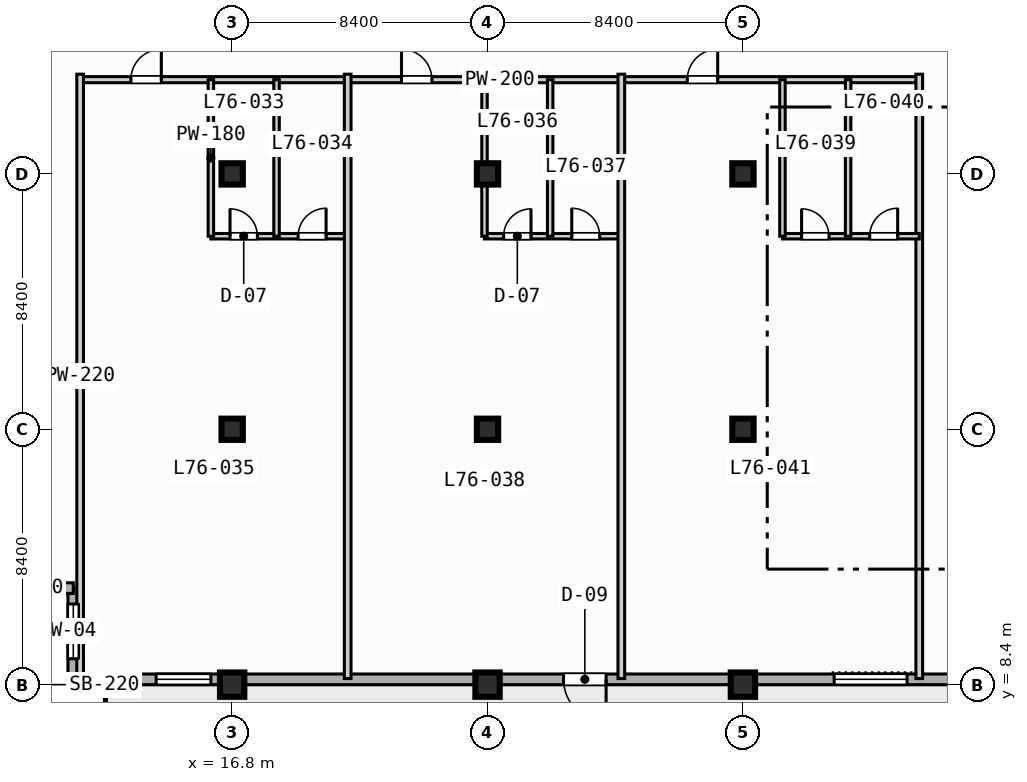
"""IFC4 building model, lengths in metres.
Left out: names, types, materials, properties, quantities, classifications, styles, units other than length and angle.
Written with IfcOpenShell. Run it as: python <this file> out.ifc"""

import sys

from ifc_helpers import new_model, si_unit, direction, frame, frame_2d, origin, origin_2d, place, context, subcontext, project, spatial, rectangle, extrude, element, fill, save


model = new_model("IFC4")
c1 = context("Model", 3, precision=1e-05, world=origin(), true_north=direction((0.0, 1.0)))
c2 = subcontext(c1, "Body", "Model", "MODEL_VIEW")
j1 = project(units=[si_unit("LENGTHUNIT", "METRE"), si_unit("PLANEANGLEUNIT", "RADIAN")], contexts=[c1])
p1 = place(None, origin())
s1 = spatial("IfcSite", under=j1, at=p1, CompositionType="ELEMENT")
p2 = place(p1, origin())
s2 = spatial("IfcBuilding", under=s1, at=p2, CompositionType="ELEMENT")
p3 = place(p2, frame((0.0, 0.0, 308.6)))
s3 = spatial("IfcBuildingStorey", under=s2, at=p3, CompositionType="ELEMENT", Elevation=308.6)
p4 = place(p3, frame((16.8, 8.4, 0.0), z_axis=(0.0, 0.0, 1.0), x_axis=(1.0, 0.0, 0.0)))
e1 = element("IfcColumn", 1, at=p4, inside=s3, PredefinedType="COLUMN", context=c2, shape_type="SweptSolid", body=[
    extrude(rectangle(XDim=0.8, YDim=0.8, at=origin_2d()), origin(), (0.0, 0.0, 1.0), 3.9),
])
for number, where, z_axis, x_axis in (
    (2, (16.8, 16.8, 0.0), (0.0, 0.0, 1.0), (1.0, 0.0, 0.0)),
    (3, (16.8, 25.2, 0.0), (0.0, 0.0, 1.0), (1.0, 0.0, 0.0)),
):
    element("IfcColumn", number, at=place(p3, frame(where, z_axis=z_axis, x_axis=x_axis)), inside=s3, PredefinedType="COLUMN", context=c2, shape_type="SweptSolid", body=[
        extrude(rectangle(XDim=0.7, YDim=0.7, at=origin_2d()), origin(), (0.0, 0.0, 1.0), 3.9),
    ])
p5 = place(p3, frame((25.2, 8.4, 0.0), z_axis=(0.0, 0.0, 1.0), x_axis=(1.0, 0.0, 0.0)))
e4 = element("IfcColumn", 4, at=p5, inside=s3, PredefinedType="COLUMN", context=c2, shape_type="SweptSolid", body=[
    extrude(rectangle(XDim=0.8, YDim=0.8, at=origin_2d()), origin(), (0.0, 0.0, 1.0), 3.9),
])
for number, where, z_axis, x_axis in (
    (5, (25.2, 16.8, 0.0), (0.0, 0.0, 1.0), (1.0, 0.0, 0.0)),
    (6, (25.2, 25.2, 0.0), (0.0, 0.0, 1.0), (1.0, 0.0, 0.0)),
):
    element("IfcColumn", number, at=place(p3, frame(where, z_axis=z_axis, x_axis=x_axis)), inside=s3, PredefinedType="COLUMN", context=c2, shape_type="SweptSolid", body=[
        extrude(rectangle(XDim=0.7, YDim=0.7, at=origin_2d()), origin(), (0.0, 0.0, 1.0), 3.9),
    ])
p6 = place(p3, frame((33.6, 8.4, 0.0), z_axis=(0.0, 0.0, 1.0), x_axis=(1.0, 0.0, 0.0)))
e7 = element("IfcColumn", 7, at=p6, inside=s3, PredefinedType="COLUMN", context=c2, shape_type="SweptSolid", body=[
    extrude(rectangle(XDim=0.8, YDim=0.8, at=origin_2d()), origin(), (0.0, 0.0, 1.0), 3.9),
])
for number, where, z_axis, x_axis in (
    (8, (33.6, 16.8, 0.0), (0.0, 0.0, 1.0), (1.0, 0.0, 0.0)),
    (9, (33.6, 25.2, 0.0), (0.0, 0.0, 1.0), (1.0, 0.0, 0.0)),
):
    element("IfcColumn", number, at=place(p3, frame(where, z_axis=z_axis, x_axis=x_axis)), inside=s3, PredefinedType="COLUMN", context=c2, shape_type="SweptSolid", body=[
        extrude(rectangle(XDim=0.7, YDim=0.7, at=origin_2d()), origin(), (0.0, 0.0, 1.0), 3.9),
    ])
p7 = place(p3, frame((11.575, 8.575, 0.0), z_axis=(0.0, 0.0, 1.0), x_axis=(0.0, 1.0, 0.0)))
e10 = element("IfcWall", 10, at=p7, inside=s3, PredefinedType="STANDARD", context=c2, shape_type="SweptSolid", body=[
    extrude(rectangle(XDim=3.0, YDim=0.35, at=frame_2d((1.5, 0.0))), origin(), (0.0, 0.0, 1.0), 3.67),
])
p8 = place(p7, frame((0.677, 0.0, 0.85)))
e11 = element("IfcOpeningElement", 11, at=p8, cuts=e10, PredefinedType="OPENING", context=c2, shape_type="SweptSolid", body=[
    extrude(rectangle(XDim=1.8, YDim=1.8, at=frame_2d((0.9, 0.9))), frame((0.0, 0.185, 0.0), z_axis=(0.0, -1.0, 0.0), x_axis=(1.0, 0.0, 0.0)), (0.0, 0.0, 1.0), 0.37),
])
p9 = place(p3, frame((11.575, 11.575, 0.0), z_axis=(0.0, 0.0, 1.0), x_axis=(-1.0, 0.0, 0.0)))
e12 = element("IfcWall", 12, at=p9, inside=s3, PredefinedType="STANDARD", context=c2, shape_type="SweptSolid", body=[
    extrude(rectangle(XDim=3.0, YDim=0.35, at=frame_2d((1.5, 0.0))), origin(), (0.0, 0.0, 1.0), 3.67),
])
p10 = place(p3, frame((64.025, 8.575, 0.0), z_axis=(0.0, 0.0, 1.0), x_axis=(-1.0, 0.0, 0.0)))
e13 = element("IfcWall", 13, at=p10, inside=s3, PredefinedType="STANDARD", context=c2, shape_type="SweptSolid", body=[
    extrude(rectangle(XDim=52.45, YDim=0.35, at=frame_2d((26.225, 0.0))), origin(), (0.0, 0.0, 1.0), 3.67),
])
p11 = place(p10, frame((34.925, 0.0, 0.0)))
e14 = element("IfcOpeningElement", 14, at=p11, cuts=e13, PredefinedType="OPENING", context=c2, shape_type="SweptSolid", body=[
    extrude(rectangle(XDim=1.4, YDim=2.2, at=frame_2d((0.7, 1.1))), frame((0.0, 0.185, 0.0), z_axis=(0.0, -1.0, 0.0), x_axis=(1.0, 0.0, 0.0)), (0.0, 0.0, 1.0), 0.37),
])
p12 = place(p10, frame((25.025, 0.0, 0.85)))
e15 = element("IfcOpeningElement", 15, at=p12, cuts=e13, PredefinedType="OPENING", context=c2, shape_type="SweptSolid", body=[
    extrude(rectangle(XDim=2.4, YDim=1.95, at=frame_2d((1.2, 0.975))), frame((0.0, 0.185, 0.0), z_axis=(0.0, -1.0, 0.0), x_axis=(1.0, 0.0, 0.0)), (0.0, 0.0, 1.0), 0.37),
])
p13 = place(p10, frame((16.925, 0.0, 0.85)))
e16 = element("IfcOpeningElement", 16, at=p13, cuts=e13, PredefinedType="OPENING", context=c2, shape_type="SweptSolid", body=[
    extrude(rectangle(XDim=1.8, YDim=1.8, at=frame_2d((0.9, 0.9))), frame((0.0, 0.185, 0.0), z_axis=(0.0, -1.0, 0.0), x_axis=(1.0, 0.0, 0.0)), (0.0, 0.0, 1.0), 0.37),
])
p14 = place(p10, frame((47.925, 0.0, 0.85)))
e17 = element("IfcOpeningElement", 17, at=p14, cuts=e13, PredefinedType="OPENING", context=c2, shape_type="SweptSolid", body=[
    extrude(rectangle(XDim=1.8, YDim=1.8, at=frame_2d((0.9, 0.9))), frame((0.0, 0.185, 0.0), z_axis=(0.0, -1.0, 0.0), x_axis=(1.0, 0.0, 0.0)), (0.0, 0.0, 1.0), 0.37),
])
p15 = place(p3, frame((11.8, 28.3, 0.0), z_axis=(0.0, 0.0, 1.0), x_axis=(1.0, 0.0, 0.0)))
e18 = element("IfcWall", 18, at=p15, inside=s3, PredefinedType="PARTITIONING", context=c2, shape_type="SweptSolid", body=[
    extrude(rectangle(XDim=27.6, YDim=0.2, at=frame_2d((13.8, 0.0))), origin(), (0.0, 0.0, 1.0), 3.67),
])
p16 = place(p15, frame((1.67, 0.0, 0.0)))
e19 = element("IfcOpeningElement", 19, at=p16, cuts=e18, PredefinedType="OPENING", context=c2, shape_type="SweptSolid", body=[
    extrude(rectangle(XDim=1.0, YDim=2.15, at=frame_2d((0.5, 1.075))), frame((0.0, 0.11, 0.0), z_axis=(0.0, -1.0, 0.0), x_axis=(1.0, 0.0, 0.0)), (0.0, 0.0, 1.0), 0.22),
])
p17 = place(p15, frame((10.57, 0.0, 0.0)))
e20 = element("IfcOpeningElement", 20, at=p17, cuts=e18, PredefinedType="OPENING", context=c2, shape_type="SweptSolid", body=[
    extrude(rectangle(XDim=1.0, YDim=2.15, at=frame_2d((0.5, 1.075))), frame((0.0, 0.11, 0.0), z_axis=(0.0, -1.0, 0.0), x_axis=(1.0, 0.0, 0.0)), (0.0, 0.0, 1.0), 0.22),
])
p18 = place(p15, frame((19.97, 0.0, 0.0)))
e21 = element("IfcOpeningElement", 21, at=p18, cuts=e18, PredefinedType="OPENING", context=c2, shape_type="SweptSolid", body=[
    extrude(rectangle(XDim=1.0, YDim=2.15, at=frame_2d((0.5, 1.075))), frame((0.0, 0.11, 0.0), z_axis=(0.0, -1.0, 0.0), x_axis=(1.0, 0.0, 0.0)), (0.0, 0.0, 1.0), 0.22),
])
p19 = place(p3, frame((11.8, 8.6, 0.0), z_axis=(0.0, 0.0, 1.0), x_axis=(0.0, 1.0, 0.0)))
e22 = element("IfcWall", 22, at=p19, inside=s3, PredefinedType="PARTITIONING", context=c2, shape_type="SweptSolid", body=[
    extrude(rectangle(XDim=19.88, YDim=0.22, at=frame_2d((9.94, 0.0))), origin(), (0.0, 0.0, 1.0), 3.67),
])
p20 = place(p3, frame((16.1, 23.15, 0.0), z_axis=(0.0, 0.0, 1.0), x_axis=(1.0, 0.0, 0.0)))
e23 = element("IfcWall", 23, at=p20, inside=s3, PredefinedType="PLUMBINGWALL", context=c2, shape_type="SweptSolid", body=[
    extrude(rectangle(XDim=4.5, YDim=0.18, at=frame_2d((2.25, 0.0))), origin(), (0.0, 0.0, 1.0), 3.67),
])
p21 = place(p20, frame((0.63, 0.0, 0.0)))
e24 = element("IfcOpeningElement", 24, at=p21, cuts=e23, PredefinedType="OPENING", context=c2, shape_type="SweptSolid", body=[
    extrude(rectangle(XDim=0.9, YDim=2.1, at=frame_2d((0.45, 1.05))), frame((0.0, 0.1, 0.0), z_axis=(0.0, -1.0, 0.0), x_axis=(1.0, 0.0, 0.0)), (0.0, 0.0, 1.0), 0.2),
])
p22 = place(p20, frame((2.87, 0.0, 0.0)))
e25 = element("IfcOpeningElement", 25, at=p22, cuts=e23, PredefinedType="OPENING", context=c2, shape_type="SweptSolid", body=[
    extrude(rectangle(XDim=0.92, YDim=2.1, at=frame_2d((0.46, 1.05))), frame((0.0, 0.1, 0.0), z_axis=(0.0, -1.0, 0.0), x_axis=(1.0, 0.0, 0.0)), (0.0, 0.0, 1.0), 0.2),
])
for number, where, z_axis, x_axis in (
    (26, (16.1, 23.15, 0.0), (0.0, 0.0, 1.0), (0.0, 1.0, 0.0)),
    (27, (18.26, 23.15, 0.0), (0.0, 0.0, 1.0), (0.0, 1.0, 0.0)),
):
    element("IfcWall", number, at=place(p3, frame(where, z_axis=z_axis, x_axis=x_axis)), inside=s3, PredefinedType="PLUMBINGWALL", context=c2, shape_type="SweptSolid", body=[
        extrude(rectangle(XDim=5.15, YDim=0.18, at=frame_2d((2.575, 0.0))), origin(), (0.0, 0.0, 1.0), 3.67),
    ])
p23 = place(p3, frame((20.6, 8.6, 0.0), z_axis=(0.0, 0.0, 1.0), x_axis=(0.0, 1.0, 0.0)))
e28 = element("IfcWall", 28, at=p23, inside=s3, PredefinedType="PARTITIONING", context=c2, shape_type="SweptSolid", body=[
    extrude(rectangle(XDim=19.88, YDim=0.22, at=frame_2d((9.94, 0.0))), origin(), (0.0, 0.0, 1.0), 3.67),
])
p24 = place(p3, frame((25.1, 23.15, 0.0), z_axis=(0.0, 0.0, 1.0), x_axis=(1.0, 0.0, 0.0)))
e29 = element("IfcWall", 29, at=p24, inside=s3, PredefinedType="PLUMBINGWALL", context=c2, shape_type="SweptSolid", body=[
    extrude(rectangle(XDim=4.5, YDim=0.18, at=frame_2d((2.25, 0.0))), origin(), (0.0, 0.0, 1.0), 3.67),
])
p25 = place(p24, frame((0.63, 0.0, 0.0)))
e30 = element("IfcOpeningElement", 30, at=p25, cuts=e29, PredefinedType="OPENING", context=c2, shape_type="SweptSolid", body=[
    extrude(rectangle(XDim=0.9, YDim=2.1, at=frame_2d((0.45, 1.05))), frame((0.0, 0.1, 0.0), z_axis=(0.0, -1.0, 0.0), x_axis=(1.0, 0.0, 0.0)), (0.0, 0.0, 1.0), 0.2),
])
p26 = place(p24, frame((2.87, 0.0, 0.0)))
e31 = element("IfcOpeningElement", 31, at=p26, cuts=e29, PredefinedType="OPENING", context=c2, shape_type="SweptSolid", body=[
    extrude(rectangle(XDim=0.92, YDim=2.1, at=frame_2d((0.46, 1.05))), frame((0.0, 0.1, 0.0), z_axis=(0.0, -1.0, 0.0), x_axis=(1.0, 0.0, 0.0)), (0.0, 0.0, 1.0), 0.2),
])
p27 = place(p3, frame((25.1, 23.15, 0.0), z_axis=(0.0, 0.0, 1.0), x_axis=(0.0, 1.0, 0.0)))
e32 = element("IfcWall", 32, at=p27, inside=s3, PredefinedType="PLUMBINGWALL", context=c2, shape_type="SweptSolid", body=[
    extrude(rectangle(XDim=5.15, YDim=0.18, at=frame_2d((2.575, 0.0))), origin(), (0.0, 0.0, 1.0), 3.07),
])
p28 = place(p3, frame((27.26, 23.15, 0.0), z_axis=(0.0, 0.0, 1.0), x_axis=(0.0, 1.0, 0.0)))
e33 = element("IfcWall", 33, at=p28, inside=s3, PredefinedType="PLUMBINGWALL", context=c2, shape_type="SweptSolid", body=[
    extrude(rectangle(XDim=5.15, YDim=0.18, at=frame_2d((2.575, 0.0))), origin(), (0.0, 0.0, 1.0), 3.67),
])
for number, where, z_axis, x_axis in (
    (34, (29.6, 8.6, 0.0), (0.0, 0.0, 1.0), (0.0, 1.0, 0.0)),
    (35, (39.4, 8.6, 0.0), (0.0, 0.0, 1.0), (0.0, 1.0, 0.0)),
):
    element("IfcWall", number, at=place(p3, frame(where, z_axis=z_axis, x_axis=x_axis)), inside=s3, PredefinedType="PARTITIONING", context=c2, shape_type="SweptSolid", body=[
        extrude(rectangle(XDim=19.88, YDim=0.22, at=frame_2d((9.94, 0.0))), origin(), (0.0, 0.0, 1.0), 3.67),
    ])
p29 = place(p3, frame((34.9, 23.15, 0.0), z_axis=(0.0, 0.0, 1.0), x_axis=(1.0, 0.0, 0.0)))
e36 = element("IfcWall", 36, at=p29, inside=s3, PredefinedType="PLUMBINGWALL", context=c2, shape_type="SweptSolid", body=[
    extrude(rectangle(XDim=4.5, YDim=0.18, at=frame_2d((2.25, 0.0))), origin(), (0.0, 0.0, 1.0), 3.67),
])
p30 = place(p29, frame((0.63, 0.0, 0.0)))
e37 = element("IfcOpeningElement", 37, at=p30, cuts=e36, PredefinedType="OPENING", context=c2, shape_type="SweptSolid", body=[
    extrude(rectangle(XDim=0.9, YDim=2.1, at=frame_2d((0.45, 1.05))), frame((0.0, 0.1, 0.0), z_axis=(0.0, -1.0, 0.0), x_axis=(1.0, 0.0, 0.0)), (0.0, 0.0, 1.0), 0.2),
])
p31 = place(p29, frame((2.87, 0.0, 0.0)))
e38 = element("IfcOpeningElement", 38, at=p31, cuts=e36, PredefinedType="OPENING", context=c2, shape_type="SweptSolid", body=[
    extrude(rectangle(XDim=0.92, YDim=2.1, at=frame_2d((0.46, 1.05))), frame((0.0, 0.1, 0.0), z_axis=(0.0, -1.0, 0.0), x_axis=(1.0, 0.0, 0.0)), (0.0, 0.0, 1.0), 0.2),
])
for number, where, z_axis, x_axis in (
    (39, (34.9, 23.15, 0.0), (0.0, 0.0, 1.0), (0.0, 1.0, 0.0)),
    (40, (37.06, 23.15, 0.0), (0.0, 0.0, 1.0), (0.0, 1.0, 0.0)),
):
    element("IfcWall", number, at=place(p3, frame(where, z_axis=z_axis, x_axis=x_axis)), inside=s3, PredefinedType="PLUMBINGWALL", context=c2, shape_type="SweptSolid", body=[
        extrude(rectangle(XDim=5.15, YDim=0.18, at=frame_2d((2.575, 0.0))), origin(), (0.0, 0.0, 1.0), 3.67),
    ])
p32 = place(p8, origin())
e41 = element("IfcWindow", 41, at=p32, inside=s3, PartitioningType="SINGLE_PANEL", PredefinedType="WINDOW", context=c2, shape_type="SweptSolid", body=[
    extrude(rectangle(XDim=1.8, YDim=1.8, at=frame_2d((0.9, 0.9))), frame((0.0, 0.03, 0.0), z_axis=(0.0, -1.0, 0.0), x_axis=(1.0, 0.0, 0.0)), (0.0, 0.0, 1.0), 0.06),
])
fill(e11, e41)
p33 = place(p11, origin())
e42 = element("IfcDoor", 42, at=p33, inside=s3, OperationType="SINGLE_SWING_LEFT", PredefinedType="DOOR", context=c2, shape_type="SweptSolid", body=[
    extrude(rectangle(XDim=1.4, YDim=2.2, at=frame_2d((0.7, 1.1))), frame((0.0, 0.025, 0.0), z_axis=(0.0, -1.0, 0.0), x_axis=(1.0, 0.0, 0.0)), (0.0, 0.0, 1.0), 0.05),
])
fill(e14, e42)
p34 = place(p12, origin())
e43 = element("IfcWindow", 43, at=p34, inside=s3, PartitioningType="SINGLE_PANEL", PredefinedType="WINDOW", context=c2, shape_type="SweptSolid", body=[
    extrude(rectangle(XDim=2.4, YDim=1.95, at=frame_2d((1.2, 0.975))), frame((0.0, 0.03, 0.0), z_axis=(0.0, -1.0, 0.0), x_axis=(1.0, 0.0, 0.0)), (0.0, 0.0, 1.0), 0.06),
])
fill(e15, e43)
p35 = place(p14, origin())
e44 = element("IfcWindow", 44, at=p35, inside=s3, PartitioningType="SINGLE_PANEL", PredefinedType="WINDOW", context=c2, shape_type="SweptSolid", body=[
    extrude(rectangle(XDim=1.8, YDim=1.8, at=frame_2d((0.9, 0.9))), frame((0.0, 0.03, 0.0), z_axis=(0.0, -1.0, 0.0), x_axis=(1.0, 0.0, 0.0)), (0.0, 0.0, 1.0), 0.06),
])
fill(e17, e44)
p36 = place(p16, origin())
e45 = element("IfcDoor", 45, at=p36, inside=s3, OperationType="SINGLE_SWING_RIGHT", PredefinedType="DOOR", context=c2, shape_type="SweptSolid", body=[
    extrude(rectangle(XDim=1.0, YDim=2.15, at=frame_2d((0.5, 1.075))), frame((0.0, 0.025, 0.0), z_axis=(0.0, -1.0, 0.0), x_axis=(1.0, 0.0, 0.0)), (0.0, 0.0, 1.0), 0.05),
])
fill(e19, e45)
p37 = place(p17, origin())
e46 = element("IfcDoor", 46, at=p37, inside=s3, OperationType="SINGLE_SWING_LEFT", PredefinedType="DOOR", context=c2, shape_type="SweptSolid", body=[
    extrude(rectangle(XDim=1.0, YDim=2.15, at=frame_2d((0.5, 1.075))), frame((0.0, 0.025, 0.0), z_axis=(0.0, -1.0, 0.0), x_axis=(1.0, 0.0, 0.0)), (0.0, 0.0, 1.0), 0.05),
])
fill(e20, e46)
p38 = place(p18, origin())
e47 = element("IfcDoor", 47, at=p38, inside=s3, OperationType="SINGLE_SWING_RIGHT", PredefinedType="DOOR", context=c2, shape_type="SweptSolid", body=[
    extrude(rectangle(XDim=1.0, YDim=2.15, at=frame_2d((0.5, 1.075))), frame((0.0, 0.025, 0.0), z_axis=(0.0, -1.0, 0.0), x_axis=(1.0, 0.0, 0.0)), (0.0, 0.0, 1.0), 0.05),
])
fill(e21, e47)
p39 = place(p21, origin())
e48 = element("IfcDoor", 48, at=p39, inside=s3, OperationType="SINGLE_SWING_LEFT", PredefinedType="DOOR", context=c2, shape_type="SweptSolid", body=[
    extrude(rectangle(XDim=0.9, YDim=2.1, at=frame_2d((0.45, 1.05))), frame((0.0, 0.025, 0.0), z_axis=(0.0, -1.0, 0.0), x_axis=(1.0, 0.0, 0.0)), (0.0, 0.0, 1.0), 0.05),
])
fill(e24, e48)
p40 = place(p22, origin())
e49 = element("IfcDoor", 49, at=p40, inside=s3, OperationType="SINGLE_SWING_RIGHT", PredefinedType="DOOR", context=c2, shape_type="SweptSolid", body=[
    extrude(rectangle(XDim=0.92, YDim=2.1, at=frame_2d((0.46, 1.05))), frame((0.0, 0.025, 0.0), z_axis=(0.0, -1.0, 0.0), x_axis=(1.0, 0.0, 0.0)), (0.0, 0.0, 1.0), 0.05),
])
fill(e25, e49)
p41 = place(p25, origin())
e50 = element("IfcDoor", 50, at=p41, inside=s3, OperationType="SINGLE_SWING_RIGHT", PredefinedType="DOOR", context=c2, shape_type="SweptSolid", body=[
    extrude(rectangle(XDim=0.9, YDim=2.1, at=frame_2d((0.45, 1.05))), frame((0.0, 0.025, 0.0), z_axis=(0.0, -1.0, 0.0), x_axis=(1.0, 0.0, 0.0)), (0.0, 0.0, 1.0), 0.05),
])
fill(e30, e50)
p42 = place(p26, origin())
e51 = element("IfcDoor", 51, at=p42, inside=s3, OperationType="SINGLE_SWING_LEFT", PredefinedType="DOOR", context=c2, shape_type="SweptSolid", body=[
    extrude(rectangle(XDim=0.92, YDim=2.1, at=frame_2d((0.46, 1.05))), frame((0.0, 0.025, 0.0), z_axis=(0.0, -1.0, 0.0), x_axis=(1.0, 0.0, 0.0)), (0.0, 0.0, 1.0), 0.05),
])
fill(e31, e51)
p43 = place(p30, origin())
e52 = element("IfcDoor", 52, at=p43, inside=s3, OperationType="SINGLE_SWING_LEFT", PredefinedType="DOOR", context=c2, shape_type="SweptSolid", body=[
    extrude(rectangle(XDim=0.9, YDim=2.1, at=frame_2d((0.45, 1.05))), frame((0.0, 0.025, 0.0), z_axis=(0.0, -1.0, 0.0), x_axis=(1.0, 0.0, 0.0)), (0.0, 0.0, 1.0), 0.05),
])
fill(e37, e52)
p44 = place(p31, origin())
e53 = element("IfcDoor", 53, at=p44, inside=s3, OperationType="SINGLE_SWING_RIGHT", PredefinedType="DOOR", context=c2, shape_type="SweptSolid", body=[
    extrude(rectangle(XDim=0.92, YDim=2.1, at=frame_2d((0.46, 1.05))), frame((0.0, 0.025, 0.0), z_axis=(0.0, -1.0, 0.0), x_axis=(1.0, 0.0, 0.0)), (0.0, 0.0, 1.0), 0.05),
])
fill(e38, e53)
save(model, sys.argv[1])
